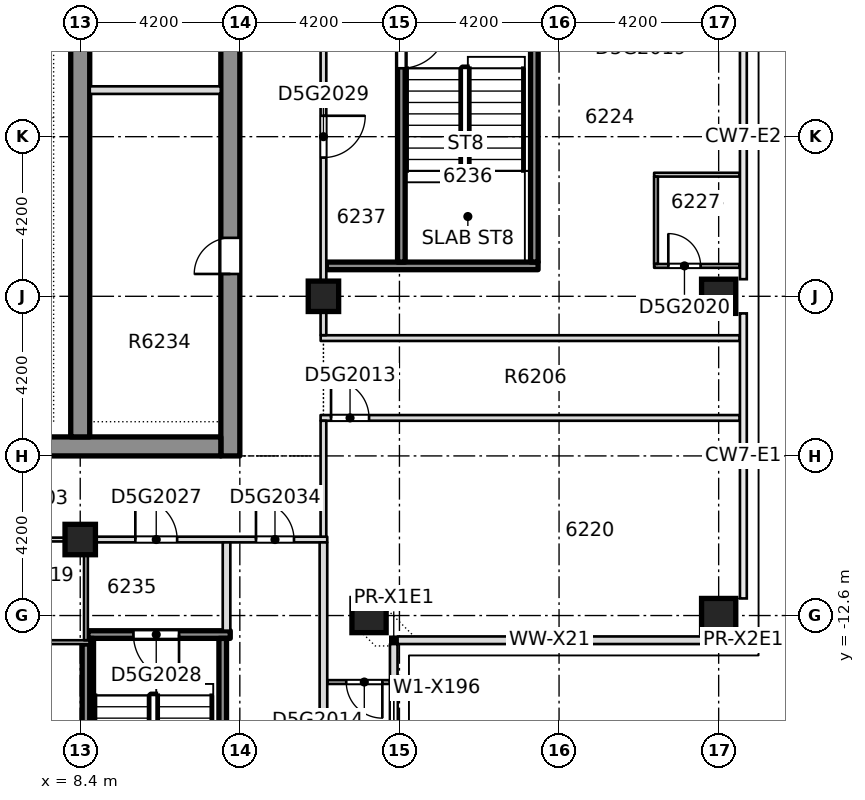
"""IFC4 building model, lengths in metres.
Left out: names, types, materials, properties, quantities, classifications, styles, units other than length and angle.
Written with IfcOpenShell. Run it as: python <this file> out.ifc"""

import sys

from ifc_helpers import new_model, si_unit, direction, frame, frame_2d, origin, origin_2d, place, context, subcontext, project, spatial, rectangle, extrude, element, fill, save


model = new_model("IFC4")
c1 = context("Model", 3, precision=1e-05, world=origin(), true_north=direction((0.0, 1.0)))
c2 = subcontext(c1, "Body", "Model", "MODEL_VIEW")
j1 = project(units=[si_unit("LENGTHUNIT", "METRE"), si_unit("PLANEANGLEUNIT", "RADIAN")], contexts=[c1])
p1 = place(None, origin())
s1 = spatial("IfcSite", under=j1, at=p1, CompositionType="ELEMENT")
p2 = place(p1, origin())
s2 = spatial("IfcBuilding", under=s1, at=p2, CompositionType="ELEMENT")
p3 = place(p2, frame((0.0, 0.0, 237.25)))
s3 = spatial("IfcBuildingStorey", under=s2, at=p3, CompositionType="ELEMENT", Elevation=237.25)
p4 = place(p3, frame((12.35, -8.4, -0.4), z_axis=(0.0, 0.0, 1.0), x_axis=(0.0, 1.0, 0.0)))
e1 = element("IfcWall", 1, at=p4, inside=s3, PredefinedType="SHEAR", context=c2, shape_type="SweptSolid", body=[
    extrude(rectangle(XDim=30.15, YDim=0.5, at=frame_2d((15.075, 0.0))), origin(), (0.0, 0.0, 1.0), 3.45),
])
p5 = place(p4, frame((4.788, 0.0, 0.4)))
e2 = element("IfcOpeningElement", 2, at=p5, cuts=e1, PredefinedType="OPENING", context=c2, shape_type="SweptSolid", body=[
    extrude(rectangle(XDim=0.95, YDim=2.1, at=frame_2d((0.475, 1.05))), frame((0.0, 0.26, 0.0), z_axis=(0.0, -1.0, 0.0), x_axis=(1.0, 0.0, 0.0)), (0.0, 0.0, 1.0), 0.52),
])
p6 = place(p4, frame((13.638, 0.0, 0.4)))
e3 = element("IfcOpeningElement", 3, at=p6, cuts=e1, PredefinedType="OPENING", context=c2, shape_type="SweptSolid", body=[
    extrude(rectangle(XDim=0.95, YDim=2.1, at=frame_2d((0.475, 1.05))), frame((0.0, 0.26, 0.0), z_axis=(0.0, -1.0, 0.0), x_axis=(1.0, 0.0, 0.0)), (0.0, 0.0, 1.0), 0.52),
])
p7 = place(p4, frame((21.771, 0.0, 0.4)))
e4 = element("IfcOpeningElement", 4, at=p7, cuts=e1, PredefinedType="OPENING", context=c2, shape_type="SweptSolid", body=[
    extrude(rectangle(XDim=0.95, YDim=2.1, at=frame_2d((0.475, 1.05))), frame((0.0, 0.26, 0.0), z_axis=(0.0, -1.0, 0.0), x_axis=(1.0, 0.0, 0.0)), (0.0, 0.0, 1.0), 0.52),
])
p8 = place(p4, frame((24.576, 0.0, 0.4)))
e5 = element("IfcOpeningElement", 5, at=p8, cuts=e1, PredefinedType="OPENING", context=c2, shape_type="SweptSolid", body=[
    extrude(rectangle(XDim=0.95, YDim=2.1, at=frame_2d((0.475, 1.05))), frame((0.0, 0.26, 0.0), z_axis=(0.0, -1.0, 0.0), x_axis=(1.0, 0.0, 0.0)), (0.0, 0.0, 1.0), 0.52),
])
p9 = place(p4, frame((27.555, 0.0, 0.4)))
e6 = element("IfcOpeningElement", 6, at=p9, cuts=e1, PredefinedType="OPENING", context=c2, shape_type="SweptSolid", body=[
    extrude(rectangle(XDim=0.95, YDim=2.1, at=frame_2d((0.475, 1.05))), frame((0.0, 0.26, 0.0), z_axis=(0.0, -1.0, 0.0), x_axis=(1.0, 0.0, 0.0)), (0.0, 0.0, 1.0), 0.52),
])
p10 = place(p4, frame((19.3, 0.0, 0.4)))
e7 = element("IfcOpeningElement", 7, at=p10, cuts=e1, PredefinedType="OPENING", context=c2, shape_type="SweptSolid", body=[
    extrude(rectangle(XDim=1.2, YDim=2.1, at=frame_2d((0.6, 1.05))), frame((0.0, 0.26, 0.0), z_axis=(0.0, -1.0, 0.0), x_axis=(1.0, 0.0, 0.0)), (0.0, 0.0, 1.0), 0.52),
])
p11 = place(p3, frame((-12.1, -8.15, -0.4), z_axis=(0.0, 0.0, 1.0), x_axis=(1.0, 0.0, 0.0)))
e8 = element("IfcWall", 8, at=p11, inside=s3, PredefinedType="SHEAR", context=c2, shape_type="SweptSolid", body=[
    extrude(rectangle(XDim=24.2, YDim=0.5, at=frame_2d((12.1, 0.0))), origin(), (0.0, 0.0, 1.0), 3.45),
])
p12 = place(p11, frame((7.35, 0.0, 0.4)))
e9 = element("IfcOpeningElement", 9, at=p12, cuts=e8, PredefinedType="OPENING", context=c2, shape_type="SweptSolid", body=[
    extrude(rectangle(XDim=1.8, YDim=2.1, at=frame_2d((0.9, 1.05))), frame((0.0, 0.26, 0.0), z_axis=(0.0, -1.0, 0.0), x_axis=(1.0, 0.0, 0.0)), (0.0, 0.0, 1.0), 0.52),
])
p13 = place(p11, frame((15.05, 0.0, 0.4)))
e10 = element("IfcOpeningElement", 10, at=p13, cuts=e8, PredefinedType="OPENING", context=c2, shape_type="SweptSolid", body=[
    extrude(rectangle(XDim=1.8, YDim=2.1, at=frame_2d((0.9, 1.05))), frame((0.0, 0.26, 0.0), z_axis=(0.0, -1.0, 0.0), x_axis=(1.0, 0.0, 0.0)), (0.0, 0.0, 1.0), 0.52),
])
p14 = place(p3, frame((8.4, -7.9, -0.4), z_axis=(0.0, 0.0, 1.0), x_axis=(0.0, 1.0, 0.0)))
e11 = element("IfcWall", 11, at=p14, inside=s3, PredefinedType="SHEAR", context=c2, shape_type="SweptSolid", body=[
    extrude(rectangle(XDim=29.15, YDim=0.5, at=frame_2d((14.575, 0.0))), origin(), (0.0, 0.0, 1.0), 3.45),
])
p15 = place(p14, frame((18.8, 0.0, 0.4)))
e12 = element("IfcOpeningElement", 12, at=p15, cuts=e11, PredefinedType="OPENING", context=c2, shape_type="SweptSolid", body=[
    extrude(rectangle(XDim=1.2, YDim=2.1, at=frame_2d((0.6, 1.05))), frame((0.0, 0.26, 0.0), z_axis=(0.0, -1.0, 0.0), x_axis=(1.0, 0.0, 0.0)), (0.0, 0.0, 1.0), 0.52),
])
for number, where, z_axis, x_axis in (
    (13, (16.0, -12.6, -0.4), (0.0, 0.0, 1.0), (1.0, 0.0, 0.0)),
    (14, (25.2, -12.6, -0.4), (0.0, 0.0, 1.0), (1.0, 0.0, 0.0)),
    (15, (25.2, -4.2, -0.4), (0.0, 0.0, 1.0), (1.0, 0.0, 0.0)),
):
    element("IfcColumn", number, at=place(p3, frame(where, z_axis=z_axis, x_axis=x_axis)), inside=s3, PredefinedType="COLUMN", context=c2, shape_type="SweptSolid", body=[
        extrude(rectangle(XDim=0.9, YDim=0.9, at=origin_2d()), origin(), (0.0, 0.0, 1.0), 3.45),
    ])
for number, where, z_axis, x_axis in (
    (16, (8.4, -10.6, -0.4), (0.0, 0.0, 1.0), (1.0, 0.0, 0.0)),
    (17, (14.8, -4.2, -0.4), (0.0, 0.0, 1.0), (1.0, 0.0, 0.0)),
):
    element("IfcColumn", number, at=place(p3, frame(where, z_axis=z_axis, x_axis=x_axis)), inside=s3, PredefinedType="COLUMN", context=c2, shape_type="SweptSolid", body=[
        extrude(rectangle(XDim=0.8, YDim=0.8, at=origin_2d()), origin(), (0.0, 0.0, 1.0), 3.45),
    ])
p16 = place(p3, frame((14.9, -14.35, 0.0), z_axis=(0.0, 0.0, 1.0), x_axis=(1.0, 0.0, 0.0)))
e18 = element("IfcWall", 18, at=p16, inside=s3, PredefinedType="PARTITIONING", context=c2, shape_type="SweptSolid", body=[
    extrude(rectangle(XDim=1.65, YDim=0.1, at=frame_2d((0.825, 0.0))), origin(), (0.0, 0.0, 1.0), 3.05),
])
p17 = place(p16, frame((0.5, 0.0, 0.0)))
e19 = element("IfcOpeningElement", 19, at=p17, cuts=e18, PredefinedType="OPENING", context=c2, shape_type="SweptSolid", body=[
    extrude(rectangle(XDim=0.95, YDim=2.1, at=frame_2d((0.475, 1.05))), frame((0.0, 0.06, 0.0), z_axis=(0.0, -1.0, 0.0), x_axis=(1.0, 0.0, 0.0)), (0.0, 0.0, 1.0), 0.12),
])
p18 = place(p3, frame((5.8, -13.3, 0.0), z_axis=(0.0, 0.0, 1.0), x_axis=(1.0, 0.0, 0.0)))
e20 = element("IfcWall", 20, at=p18, inside=s3, PredefinedType="PARTITIONING", context=c2, shape_type="SweptSolid", body=[
    extrude(rectangle(XDim=2.85, YDim=0.1, at=frame_2d((1.425, 0.0))), origin(), (0.0, 0.0, 1.0), 3.05),
])
p19 = place(p18, frame((0.25, 0.0, 0.0)))
e21 = element("IfcOpeningElement", 21, at=p19, cuts=e20, PredefinedType="OPENING", context=c2, shape_type="SweptSolid", body=[
    extrude(rectangle(XDim=0.85, YDim=2.1, at=frame_2d((0.425, 1.05))), frame((0.0, 0.06, 0.0), z_axis=(0.0, -1.0, 0.0), x_axis=(1.0, 0.0, 0.0)), (0.0, 0.0, 1.0), 0.12),
])
p20 = place(p3, frame((8.602, -13.1, 0.0), z_axis=(0.0, 0.0, 1.0), x_axis=(1.0, 0.0, 0.0)))
e22 = element("IfcWall", 22, at=p20, inside=s3, PredefinedType="SOLIDWALL", context=c2, shape_type="SweptSolid", body=[
    extrude(rectangle(XDim=3.746, YDim=0.2, at=frame_2d((1.873, 0.0))), origin(), (0.0, 0.0, 1.0), 3.05),
])
p21 = place(p20, frame((1.198, 0.0, 0.0)))
e23 = element("IfcOpeningElement", 23, at=p21, cuts=e22, PredefinedType="OPENING", context=c2, shape_type="SweptSolid", body=[
    extrude(rectangle(XDim=1.2, YDim=2.1, at=frame_2d((0.6, 1.05))), frame((0.0, 0.11, 0.0), z_axis=(0.0, -1.0, 0.0), x_axis=(1.0, 0.0, 0.0)), (0.0, 0.0, 1.0), 0.22),
])
p22 = place(p3, frame((5.8, -10.6, 0.0), z_axis=(0.0, 0.0, 1.0), x_axis=(1.0, 0.0, 0.0)))
e24 = element("IfcWall", 24, at=p22, inside=s3, PredefinedType="PARTITIONING", context=c2, shape_type="SweptSolid", body=[
    extrude(rectangle(XDim=2.8, YDim=0.1, at=frame_2d((1.4, 0.0))), origin(), (0.0, 0.0, 1.0), 3.05),
])
p23 = place(p3, frame((8.5, -10.6, 0.0), z_axis=(0.0, 0.0, 1.0), x_axis=(1.0, 0.0, 0.0)))
e25 = element("IfcWall", 25, at=p23, inside=s3, PredefinedType="PARTITIONING", context=c2, shape_type="SweptSolid", body=[
    extrude(rectangle(XDim=6.4, YDim=0.15, at=frame_2d((3.2, 0.0))), origin(), (0.0, 0.0, 1.0), 3.05),
])
p24 = place(p23, frame((1.35, 0.0, 0.0)))
e26 = element("IfcOpeningElement", 26, at=p24, cuts=e25, PredefinedType="OPENING", context=c2, shape_type="SweptSolid", body=[
    extrude(rectangle(XDim=1.1, YDim=2.1, at=frame_2d((0.55, 1.05))), frame((0.0, 0.085, 0.0), z_axis=(0.0, -1.0, 0.0), x_axis=(1.0, 0.0, 0.0)), (0.0, 0.0, 1.0), 0.17),
])
p25 = place(p23, frame((4.525, 0.0, 0.0)))
e27 = element("IfcOpeningElement", 27, at=p25, cuts=e25, PredefinedType="OPENING", context=c2, shape_type="SweptSolid", body=[
    extrude(rectangle(XDim=1.0, YDim=2.1, at=frame_2d((0.5, 1.05))), frame((0.0, 0.085, 0.0), z_axis=(0.0, -1.0, 0.0), x_axis=(1.0, 0.0, 0.0)), (0.0, 0.0, 1.0), 0.17),
])
p26 = place(p3, frame((14.725, -7.4, 0.0), z_axis=(0.0, 0.0, 1.0), x_axis=(1.0, 0.0, 0.0)))
e28 = element("IfcWall", 28, at=p26, inside=s3, PredefinedType="PARTITIONING", context=c2, shape_type="SweptSolid", body=[
    extrude(rectangle(XDim=11.025, YDim=0.15, at=frame_2d((5.512, 0.0))), origin(), (0.0, 0.0, 1.0), 3.05),
])
p27 = place(p26, frame((0.275, 0.0, 0.0)))
e29 = element("IfcOpeningElement", 29, at=p27, cuts=e28, PredefinedType="OPENING", context=c2, shape_type="SweptSolid", body=[
    extrude(rectangle(XDim=1.0, YDim=2.1, at=frame_2d((0.5, 1.05))), frame((0.0, 0.085, 0.0), z_axis=(0.0, -1.0, 0.0), x_axis=(1.0, 0.0, 0.0)), (0.0, 0.0, 1.0), 0.17),
])
p28 = place(p3, frame((14.727, -5.3, 0.0), z_axis=(0.0, 0.0, 1.0), x_axis=(1.0, 0.0, 0.0)))
e30 = element("IfcWall", 30, at=p28, inside=s3, PredefinedType="PARTITIONING", context=c2, shape_type="SweptSolid", body=[
    extrude(rectangle(XDim=11.023, YDim=0.15, at=frame_2d((5.511, 0.0))), origin(), (0.0, 0.0, 1.0), 3.05),
])
p29 = place(p3, frame((14.877, -3.4, 0.0), z_axis=(0.0, 0.0, 1.0), x_axis=(1.0, 0.0, 0.0)))
e31 = element("IfcWall", 31, at=p29, inside=s3, PredefinedType="SOLIDWALL", context=c2, shape_type="SweptSolid", body=[
    extrude(rectangle(XDim=5.571, YDim=0.2, at=frame_2d((2.786, 0.0))), origin(), (0.0, 0.0, 1.0), 3.05),
])
p30 = place(p3, frame((23.502, -3.4, 0.0), z_axis=(0.0, 0.0, 1.0), x_axis=(1.0, 0.0, 0.0)))
e32 = element("IfcWall", 32, at=p30, inside=s3, PredefinedType="PARTITIONING", context=c2, shape_type="SweptSolid", body=[
    extrude(rectangle(XDim=2.248, YDim=0.1, at=frame_2d((1.124, 0.0))), origin(), (0.0, 0.0, 1.0), 3.05),
])
p31 = place(p30, frame((0.373, 0.0, 0.0)))
e33 = element("IfcOpeningElement", 33, at=p31, cuts=e32, PredefinedType="OPENING", context=c2, shape_type="SweptSolid", body=[
    extrude(rectangle(XDim=0.85, YDim=2.1, at=frame_2d((0.425, 1.05))), frame((0.0, 0.06, 0.0), z_axis=(0.0, -1.0, 0.0), x_axis=(1.0, 0.0, 0.0)), (0.0, 0.0, 1.0), 0.12),
])
p32 = place(p3, frame((23.502, -1.0, 0.0), z_axis=(0.0, 0.0, 1.0), x_axis=(1.0, 0.0, 0.0)))
e34 = element("IfcWall", 34, at=p32, inside=s3, PredefinedType="PARTITIONING", context=c2, shape_type="SweptSolid", body=[
    extrude(rectangle(XDim=2.248, YDim=0.1, at=frame_2d((1.124, 0.0))), origin(), (0.0, 0.0, 1.0), 3.05),
])
p33 = place(p3, frame((8.55, -13.25, 0.0), z_axis=(0.0, 0.0, 1.0), x_axis=(0.0, 1.0, 0.0)))
e35 = element("IfcWall", 35, at=p33, inside=s3, PredefinedType="PARTITIONING", context=c2, shape_type="SweptSolid", body=[
    extrude(rectangle(XDim=2.575, YDim=0.1, at=frame_2d((1.288, 0.0))), origin(), (0.0, 0.0, 1.0), 3.05),
])
for number, where, z_axis, x_axis in (
    (36, (8.65, -19.798, 0.0), (0.0, 0.0, 1.0), (0.0, 1.0, 0.0)),
    (37, (12.15, -19.798, 0.0), (0.0, 0.0, 1.0), (0.0, 1.0, 0.0)),
):
    element("IfcWall", number, at=place(p3, frame(where, z_axis=z_axis, x_axis=x_axis)), inside=s3, PredefinedType="SOLIDWALL", context=c2, shape_type="SweptSolid", body=[
        extrude(rectangle(XDim=6.596, YDim=0.2, at=frame_2d((3.298, 0.0))), origin(), (0.0, 0.0, 1.0), 3.05),
    ])
p34 = place(p3, frame((12.25, -12.998, 0.0), z_axis=(0.0, 0.0, 1.0), x_axis=(0.0, 1.0, 0.0)))
e38 = element("IfcWall", 38, at=p34, inside=s3, PredefinedType="PARTITIONING", context=c2, shape_type="SweptSolid", body=[
    extrude(rectangle(XDim=2.323, YDim=0.2, at=frame_2d((1.162, 0.0))), origin(), (0.0, 0.0, 1.0), 3.05),
])
p35 = place(p3, frame((14.8, -18.7, 0.0), z_axis=(0.0, 0.0, 1.0), x_axis=(0.0, 1.0, 0.0)))
e39 = element("IfcWall", 39, at=p35, inside=s3, PredefinedType="PARTITIONING", context=c2, shape_type="SweptSolid", body=[
    extrude(rectangle(XDim=8.025, YDim=0.2, at=frame_2d((4.012, 0.0))), origin(), (0.0, 0.0, 1.0), 3.05),
])
p36 = place(p3, frame((14.8, -10.525, 0.0), z_axis=(0.0, 0.0, 1.0), x_axis=(0.0, 1.0, 0.0)))
e40 = element("IfcWall", 40, at=p36, inside=s3, PredefinedType="PARTITIONING", context=c2, shape_type="SweptSolid", body=[
    extrude(rectangle(XDim=3.05, YDim=0.15, at=frame_2d((1.525, 0.0))), origin(), (0.0, 0.0, 1.0), 3.05),
])
p37 = place(p3, frame((14.8, -5.223, 0.0), z_axis=(0.0, 0.0, 1.0), x_axis=(0.0, 1.0, 0.0)))
e41 = element("IfcWall", 41, at=p37, inside=s3, PredefinedType="PARTITIONING", context=c2, shape_type="SweptSolid", body=[
    extrude(rectangle(XDim=17.748, YDim=0.15, at=frame_2d((8.874, 0.0))), origin(), (0.0, 0.0, 1.0), 3.05),
])
p38 = place(p37, frame((12.723, 0.0, 0.0)))
e42 = element("IfcOpeningElement", 42, at=p38, cuts=e41, PredefinedType="OPENING", context=c2, shape_type="SweptSolid", body=[
    extrude(rectangle(XDim=1.0, YDim=2.1, at=frame_2d((0.5, 1.05))), frame((0.0, 0.085, 0.0), z_axis=(0.0, -1.0, 0.0), x_axis=(1.0, 0.0, 0.0)), (0.0, 0.0, 1.0), 0.17),
])
p39 = place(p37, frame((4.673, 0.0, 0.0)))
e43 = element("IfcOpeningElement", 43, at=p39, cuts=e41, PredefinedType="OPENING", context=c2, shape_type="SweptSolid", body=[
    extrude(rectangle(XDim=1.1, YDim=2.1, at=frame_2d((0.55, 1.05))), frame((0.0, 0.085, 0.0), z_axis=(0.0, -1.0, 0.0), x_axis=(1.0, 0.0, 0.0)), (0.0, 0.0, 1.0), 0.17),
])
p40 = place(p3, frame((16.85, -3.3, 0.0), z_axis=(0.0, 0.0, 1.0), x_axis=(0.0, 1.0, 0.0)))
e44 = element("IfcWall", 44, at=p40, inside=s3, PredefinedType="SOLIDWALL", context=c2, shape_type="SweptSolid", body=[
    extrude(rectangle(XDim=6.6, YDim=0.2, at=frame_2d((3.3, 0.0))), origin(), (0.0, 0.0, 1.0), 3.05),
])
p41 = place(p40, frame((5.1, 0.0, 0.0)))
e45 = element("IfcOpeningElement", 45, at=p41, cuts=e44, PredefinedType="OPENING", context=c2, shape_type="SweptSolid", body=[
    extrude(rectangle(XDim=1.2, YDim=2.1, at=frame_2d((0.6, 1.05))), frame((0.0, 0.11, 0.0), z_axis=(0.0, -1.0, 0.0), x_axis=(1.0, 0.0, 0.0)), (0.0, 0.0, 1.0), 0.22),
])
p42 = place(p3, frame((23.55, -3.348, 0.0), z_axis=(0.0, 0.0, 1.0), x_axis=(0.0, 1.0, 0.0)))
e46 = element("IfcWall", 46, at=p42, inside=s3, PredefinedType="PARTITIONING", context=c2, shape_type="SweptSolid", body=[
    extrude(rectangle(XDim=2.296, YDim=0.1, at=frame_2d((1.148, 0.0))), origin(), (0.0, 0.0, 1.0), 3.05),
])
p43 = place(p3, frame((16.65, -20.55, 0.0), z_axis=(0.0, 0.0, 1.0), x_axis=(0.0, 1.0, 0.0)))
e47 = element("IfcWall", 47, at=p43, inside=s3, PredefinedType="STANDARD", context=c2, shape_type="SweptSolid", body=[
    extrude(rectangle(XDim=7.2, YDim=0.2, at=frame_2d((3.6, 0.0))), origin(), (0.0, 0.0, 1.0), 3.05),
])
p44 = place(p43, frame((1.97, 0.0, 0.2)))
e48 = element("IfcOpeningElement", 48, at=p44, cuts=e47, PredefinedType="OPENING", context=c2, shape_type="SweptSolid", body=[
    extrude(rectangle(XDim=1.8, YDim=2.65, at=frame_2d((0.9, 1.325))), frame((0.0, 0.11, 0.0), z_axis=(0.0, -1.0, 0.0), x_axis=(1.0, 0.0, 0.0)), (0.0, 0.0, 1.0), 0.22),
])
p45 = place(p43, frame((4.025, 0.0, 0.2)))
e49 = element("IfcOpeningElement", 49, at=p45, cuts=e47, PredefinedType="OPENING", context=c2, shape_type="SweptSolid", body=[
    extrude(rectangle(XDim=1.8, YDim=2.65, at=frame_2d((0.9, 1.325))), frame((0.0, 0.11, 0.0), z_axis=(0.0, -1.0, 0.0), x_axis=(1.0, 0.0, 0.0)), (0.0, 0.0, 1.0), 0.22),
])
p46 = place(p3, frame((16.75, -13.25, 0.0), z_axis=(0.0, 0.0, 1.0), x_axis=(1.0, 0.0, 0.0)))
e50 = element("IfcWall", 50, at=p46, inside=s3, PredefinedType="STANDARD", context=c2, shape_type="SweptSolid", body=[
    extrude(rectangle(XDim=8.0, YDim=0.2, at=frame_2d((4.0, 0.0))), origin(), (0.0, 0.0, 1.0), 3.05),
])
p47 = place(p3, frame((8.651, 1.225, 0.0), z_axis=(0.0, 0.0, 1.0), x_axis=(1.0, 0.0, 0.0)))
e51 = element("IfcWall", 51, at=p47, inside=s3, PredefinedType="PARTITIONING", context=c2, shape_type="SweptSolid", body=[
    extrude(rectangle(XDim=3.448, YDim=0.2, at=frame_2d((1.724, 0.0))), origin(), (0.0, 0.0, 1.0), 3.05),
])
p48 = place(p3, frame((20.35, -3.298, 0.0), z_axis=(0.0, 0.0, 1.0), x_axis=(0.0, 1.0, 0.0)))
e52 = element("IfcWall", 52, at=p48, inside=s3, PredefinedType="SOLIDWALL", context=c2, shape_type="SweptSolid", body=[
    extrude(rectangle(XDim=6.598, YDim=0.2, at=frame_2d((3.299, 0.0))), origin(), (0.0, 0.0, 1.0), 3.05),
])
p49 = place(p3, frame((8.55, -21.55, 0.0), z_axis=(0.0, 0.0, 1.0), x_axis=(0.0, 1.0, 0.0)))
e53 = element("IfcWall", 53, at=p49, inside=s3, PredefinedType="SOLIDWALL", context=c2, shape_type="SweptSolid", body=[
    extrude(rectangle(XDim=8.2, YDim=0.2, at=frame_2d((4.1, 0.0))), origin(), (0.0, 0.0, 1.0), 3.05),
])
p50 = place(p27, origin())
e54 = element("IfcDoor", 54, at=p50, inside=s3, OperationType="SINGLE_SWING_RIGHT", PredefinedType="DOOR", context=c2, shape_type="SweptSolid", body=[
    extrude(rectangle(XDim=1.0, YDim=2.1, at=frame_2d((0.5, 1.05))), frame((0.0, 0.025, 0.0), z_axis=(0.0, -1.0, 0.0), x_axis=(1.0, 0.0, 0.0)), (0.0, 0.0, 1.0), 0.05),
])
fill(e29, e54)
p51 = place(p17, origin())
e55 = element("IfcDoor", 55, at=p51, inside=s3, OperationType="SINGLE_SWING_RIGHT", PredefinedType="DOOR", context=c2, shape_type="SweptSolid", body=[
    extrude(rectangle(XDim=0.95, YDim=2.1, at=frame_2d((0.475, 1.05))), frame((0.0, 0.025, 0.0), z_axis=(0.0, -1.0, 0.0), x_axis=(1.0, 0.0, 0.0)), (0.0, 0.0, 1.0), 0.05),
])
fill(e19, e55)
p52 = place(p31, origin())
e56 = element("IfcDoor", 56, at=p52, inside=s3, OperationType="SINGLE_SWING_LEFT", PredefinedType="DOOR", context=c2, shape_type="SweptSolid", body=[
    extrude(rectangle(XDim=0.85, YDim=2.1, at=frame_2d((0.425, 1.05))), frame((0.0, 0.025, 0.0), z_axis=(0.0, -1.0, 0.0), x_axis=(1.0, 0.0, 0.0)), (0.0, 0.0, 1.0), 0.05),
])
fill(e33, e56)
p53 = place(p24, origin())
e57 = element("IfcDoor", 57, at=p53, inside=s3, OperationType="SINGLE_SWING_RIGHT", PredefinedType="DOOR", context=c2, shape_type="SweptSolid", body=[
    extrude(rectangle(XDim=1.1, YDim=2.1, at=frame_2d((0.55, 1.05))), frame((0.0, 0.025, 0.0), z_axis=(0.0, -1.0, 0.0), x_axis=(1.0, 0.0, 0.0)), (0.0, 0.0, 1.0), 0.05),
])
fill(e26, e57)
p54 = place(p21, origin())
e58 = element("IfcDoor", 58, at=p54, inside=s3, OperationType="SINGLE_SWING_RIGHT", PredefinedType="DOOR", context=c2, shape_type="SweptSolid", body=[
    extrude(rectangle(XDim=1.2, YDim=2.1, at=frame_2d((0.6, 1.05))), frame((0.0, 0.025, 0.0), z_axis=(0.0, -1.0, 0.0), x_axis=(1.0, 0.0, 0.0)), (0.0, 0.0, 1.0), 0.05),
])
fill(e23, e58)
p55 = place(p39, origin())
e59 = element("IfcDoor", 59, at=p55, inside=s3, OperationType="SINGLE_SWING_RIGHT", PredefinedType="DOOR", context=c2, shape_type="SweptSolid", body=[
    extrude(rectangle(XDim=1.1, YDim=2.1, at=frame_2d((0.55, 1.05))), frame((0.0, 0.025, 0.0), z_axis=(0.0, -1.0, 0.0), x_axis=(1.0, 0.0, 0.0)), (0.0, 0.0, 1.0), 0.05),
])
fill(e43, e59)
p56 = place(p41, origin())
e60 = element("IfcDoor", 60, at=p56, inside=s3, OperationType="SINGLE_SWING_LEFT", PredefinedType="DOOR", context=c2, shape_type="SweptSolid", body=[
    extrude(rectangle(XDim=1.2, YDim=2.1, at=frame_2d((0.6, 1.05))), frame((0.0, 0.025, 0.0), z_axis=(0.0, -1.0, 0.0), x_axis=(1.0, 0.0, 0.0)), (0.0, 0.0, 1.0), 0.05),
])
fill(e45, e60)
p57 = place(p25, origin())
e61 = element("IfcDoor", 61, at=p57, inside=s3, OperationType="SINGLE_SWING_RIGHT", PredefinedType="DOOR", context=c2, shape_type="SweptSolid", body=[
    extrude(rectangle(XDim=1.0, YDim=2.1, at=frame_2d((0.5, 1.05))), frame((0.0, 0.025, 0.0), z_axis=(0.0, -1.0, 0.0), x_axis=(1.0, 0.0, 0.0)), (0.0, 0.0, 1.0), 0.05),
])
fill(e27, e61)
p58 = place(p45, origin())
e62 = element("IfcWindow", 62, at=p58, inside=s3, PartitioningType="SINGLE_PANEL", PredefinedType="WINDOW", context=c2, shape_type="SweptSolid", body=[
    extrude(rectangle(XDim=1.8, YDim=2.65, at=frame_2d((0.9, 1.325))), frame((0.0, 0.03, 0.0), z_axis=(0.0, -1.0, 0.0), x_axis=(1.0, 0.0, 0.0)), (0.0, 0.0, 1.0), 0.06),
])
fill(e49, e62)
p59 = place(p5, origin())
e63 = element("IfcDoor", 63, at=p59, inside=s3, OperationType="SINGLE_SWING_LEFT", PredefinedType="DOOR", context=c2, shape_type="SweptSolid", body=[
    extrude(rectangle(XDim=0.95, YDim=2.1, at=frame_2d((0.475, 1.05))), frame((0.0, 0.025, 0.0), z_axis=(0.0, -1.0, 0.0), x_axis=(1.0, 0.0, 0.0)), (0.0, 0.0, 1.0), 0.05),
])
fill(e2, e63)
save(model, sys.argv[1])
